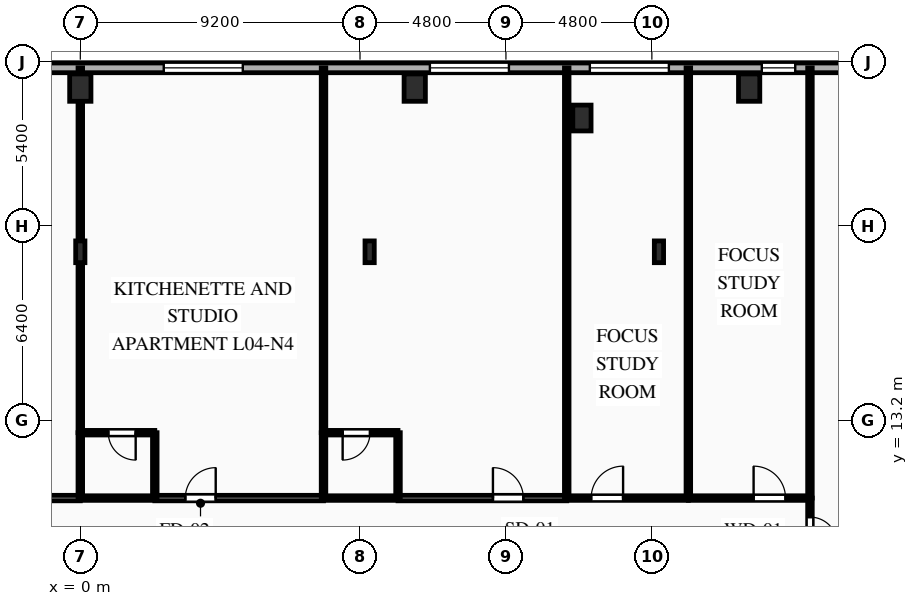
"""IFC4 building model, lengths in metres.
Left out: names, types, materials, properties, quantities, classifications, styles, units other than length and angle.
Written with IfcOpenShell. Run it as: python <this file> out.ifc"""

import sys

from ifc_helpers import new_model, si_unit, direction, frame, frame_2d, origin, origin_2d, place, context, subcontext, project, spatial, rectangle, i_section, extrude, element, fill, save


model = new_model("IFC4")
c1 = context("Model", 3, precision=1e-05, world=origin(), true_north=direction((0.0, 1.0)))
c2 = subcontext(c1, "Body", "Model", "MODEL_VIEW")
j1 = project(units=[si_unit("LENGTHUNIT", "METRE"), si_unit("PLANEANGLEUNIT", "RADIAN")], contexts=[c1])
p1 = place(None, origin())
s1 = spatial("IfcSite", under=j1, at=p1, CompositionType="ELEMENT")
p2 = place(p1, origin())
s2 = spatial("IfcBuilding", under=s1, at=p2, CompositionType="ELEMENT")
p3 = place(p2, frame((0.0, 0.0, 18.0)))
s3 = spatial("IfcBuildingStorey", under=s2, at=p3, CompositionType="ELEMENT", Elevation=18.0)
for number, where, z_axis, x_axis in (
    (1, (0.0, 24.15, 0.0), (0.0, 0.0, 1.0), (1.0, 0.0, 0.0)),
    (2, (11.0, 24.15, 0.0), (0.0, 0.0, 1.0), (1.0, 0.0, 0.0)),
    (3, (22.0, 24.15, 0.0), (0.0, 0.0, 1.0), (1.0, 0.0, 0.0)),
):
    element("IfcColumn", number, at=place(p3, frame(where, z_axis=z_axis, x_axis=x_axis)), inside=s3, PredefinedType="COLUMN", context=c2, shape_type="SweptSolid", body=[
        extrude(rectangle(XDim=0.7, YDim=0.9, at=origin_2d()), origin(), (0.0, 0.0, 1.0), 4.5),
    ])
p4 = place(p3, frame((16.5, 23.15, 0.0), z_axis=(0.0, 0.0, 1.0), x_axis=(1.0, 0.0, 0.0)))
e4 = element("IfcColumn", 4, at=p4, inside=s3, PredefinedType="PILASTER", context=c2, shape_type="SweptSolid", body=[
    extrude(rectangle(XDim=0.6, YDim=0.85, at=origin_2d()), origin(), (0.0, 0.0, 1.0), 4.5),
])
for number, where, z_axis, x_axis in (
    (5, (19.033, 18.75, 0.0), (0.0, 0.0, 1.0), (1.0, 0.0, 0.0)),
    (6, (9.517, 18.75, 0.0), (0.0, 0.0, 1.0), (1.0, 0.0, 0.0)),
    (7, (0.0, 18.75, 0.0), (0.0, 0.0, 1.0), (1.0, 0.0, 0.0)),
):
    element("IfcColumn", number, at=place(p3, frame(where, z_axis=z_axis, x_axis=x_axis)), inside=s3, PredefinedType="COLUMN", context=c2, shape_type="SweptSolid", body=[
        extrude(i_section(OverallWidth=0.304, OverallDepth=0.716, WebThickness=0.021, FlangeThickness=0.04, FilletRadius=0.027, at=origin_2d()), origin(), (0.0, 0.0, 1.0), 4.5),
    ])
p5 = place(p3, frame((-36.8, 24.8, 0.0), z_axis=(0.0, 0.0, 1.0), x_axis=(1.0, 0.0, 0.0)))
e8 = element("IfcWall", 8, at=p5, inside=s3, PredefinedType="SOLIDWALL", context=c2, shape_type="SweptSolid", body=[
    extrude(rectangle(XDim=73.6, YDim=0.32, at=frame_2d((36.8, 0.0))), origin(), (0.0, 0.0, 1.0), 4.17),
])
p6 = place(p5, frame((1.079, 0.0, 0.85)))
e9 = element("IfcOpeningElement", 9, at=p6, cuts=e8, PredefinedType="OPENING", context=c2, shape_type="SweptSolid", body=[
    extrude(rectangle(XDim=2.3, YDim=2.4, at=frame_2d((1.15, 1.2))), frame((0.0, 0.17, 0.0), z_axis=(0.0, -1.0, 0.0), x_axis=(1.0, 0.0, 0.0)), (0.0, 0.0, 1.0), 0.34),
])
p7 = place(p5, frame((8.431, 0.0, 0.85)))
e10 = element("IfcOpeningElement", 10, at=p7, cuts=e8, PredefinedType="OPENING", context=c2, shape_type="SweptSolid", body=[
    extrude(rectangle(XDim=2.6, YDim=2.4, at=frame_2d((1.3, 1.2))), frame((0.0, 0.17, 0.0), z_axis=(0.0, -1.0, 0.0), x_axis=(1.0, 0.0, 0.0)), (0.0, 0.0, 1.0), 0.34),
])
p8 = place(p5, frame((15.168, 0.0, 0.85)))
e11 = element("IfcOpeningElement", 11, at=p8, cuts=e8, PredefinedType="OPENING", context=c2, shape_type="SweptSolid", body=[
    extrude(rectangle(XDim=1.1, YDim=1.85, at=frame_2d((0.55, 0.925))), frame((0.0, 0.17, 0.0), z_axis=(0.0, -1.0, 0.0), x_axis=(1.0, 0.0, 0.0)), (0.0, 0.0, 1.0), 0.34),
])
p9 = place(p5, frame((17.521, 0.0, 0.85)))
e12 = element("IfcOpeningElement", 12, at=p9, cuts=e8, PredefinedType="OPENING", context=c2, shape_type="SweptSolid", body=[
    extrude(rectangle(XDim=2.6, YDim=2.4, at=frame_2d((1.3, 1.2))), frame((0.0, 0.17, 0.0), z_axis=(0.0, -1.0, 0.0), x_axis=(1.0, 0.0, 0.0)), (0.0, 0.0, 1.0), 0.34),
])
p10 = place(p5, frame((26.246, 0.0, 0.85)))
e13 = element("IfcOpeningElement", 13, at=p10, cuts=e8, PredefinedType="OPENING", context=c2, shape_type="SweptSolid", body=[
    extrude(rectangle(XDim=2.0, YDim=2.4, at=frame_2d((1.0, 1.2))), frame((0.0, 0.17, 0.0), z_axis=(0.0, -1.0, 0.0), x_axis=(1.0, 0.0, 0.0)), (0.0, 0.0, 1.0), 0.34),
])
p11 = place(p5, frame((31.536, 0.0, 0.85)))
e14 = element("IfcOpeningElement", 14, at=p11, cuts=e8, PredefinedType="OPENING", context=c2, shape_type="SweptSolid", body=[
    extrude(rectangle(XDim=2.6, YDim=2.4, at=frame_2d((1.3, 1.2))), frame((0.0, 0.17, 0.0), z_axis=(0.0, -1.0, 0.0), x_axis=(1.0, 0.0, 0.0)), (0.0, 0.0, 1.0), 0.34),
])
p12 = place(p5, frame((39.544, 0.0, 0.85)))
e15 = element("IfcOpeningElement", 15, at=p12, cuts=e8, PredefinedType="OPENING", context=c2, shape_type="SweptSolid", body=[
    extrude(rectangle(XDim=2.6, YDim=2.4, at=frame_2d((1.3, 1.2))), frame((0.0, 0.17, 0.0), z_axis=(0.0, -1.0, 0.0), x_axis=(1.0, 0.0, 0.0)), (0.0, 0.0, 1.0), 0.34),
])
p13 = place(p5, frame((48.298, 0.0, 0.85)))
e16 = element("IfcOpeningElement", 16, at=p13, cuts=e8, PredefinedType="OPENING", context=c2, shape_type="SweptSolid", body=[
    extrude(rectangle(XDim=2.6, YDim=2.4, at=frame_2d((1.3, 1.2))), frame((0.0, 0.17, 0.0), z_axis=(0.0, -1.0, 0.0), x_axis=(1.0, 0.0, 0.0)), (0.0, 0.0, 1.0), 0.34),
])
p14 = place(p5, frame((53.56, 0.0, 0.85)))
e17 = element("IfcOpeningElement", 17, at=p14, cuts=e8, PredefinedType="OPENING", context=c2, shape_type="SweptSolid", body=[
    extrude(rectangle(XDim=2.6, YDim=2.4, at=frame_2d((1.3, 1.2))), frame((0.0, 0.17, 0.0), z_axis=(0.0, -1.0, 0.0), x_axis=(1.0, 0.0, 0.0)), (0.0, 0.0, 1.0), 0.34),
])
p15 = place(p5, frame((59.216, 0.0, 0.85)))
e18 = element("IfcOpeningElement", 18, at=p15, cuts=e8, PredefinedType="OPENING", context=c2, shape_type="SweptSolid", body=[
    extrude(rectangle(XDim=1.1, YDim=1.85, at=frame_2d((0.55, 0.925))), frame((0.0, 0.17, 0.0), z_axis=(0.0, -1.0, 0.0), x_axis=(1.0, 0.0, 0.0)), (0.0, 0.0, 1.0), 0.34),
])
p16 = place(p5, frame((62.649, 0.0, 0.85)))
e19 = element("IfcOpeningElement", 19, at=p16, cuts=e8, PredefinedType="OPENING", context=c2, shape_type="SweptSolid", body=[
    extrude(rectangle(XDim=2.6, YDim=2.4, at=frame_2d((1.3, 1.2))), frame((0.0, 0.17, 0.0), z_axis=(0.0, -1.0, 0.0), x_axis=(1.0, 0.0, 0.0)), (0.0, 0.0, 1.0), 0.34),
])
p17 = place(p5, frame((70.301, 0.0, 0.85)))
e20 = element("IfcOpeningElement", 20, at=p17, cuts=e8, PredefinedType="OPENING", context=c2, shape_type="SweptSolid", body=[
    extrude(rectangle(XDim=2.3, YDim=2.4, at=frame_2d((1.15, 1.2))), frame((0.0, 0.17, 0.0), z_axis=(0.0, -1.0, 0.0), x_axis=(1.0, 0.0, 0.0)), (0.0, 0.0, 1.0), 0.34),
])
p18 = place(p3, frame((-5.55, 10.65, 0.0), z_axis=(0.0, 0.0, 1.0), x_axis=(1.0, 0.0, 0.0)))
e21 = element("IfcWall", 21, at=p18, inside=s3, PredefinedType="PARTITIONING", context=c2, shape_type="SweptSolid", body=[
    extrude(rectangle(XDim=5.55, YDim=0.18, at=frame_2d((2.775, 0.0))), origin(), (0.0, 0.0, 1.0), 4.17),
])
p19 = place(p18, frame((3.123, 0.0, 0.0)))
e22 = element("IfcOpeningElement", 22, at=p19, cuts=e21, PredefinedType="OPENING", context=c2, shape_type="SweptSolid", body=[
    extrude(rectangle(XDim=1.0, YDim=2.15, at=frame_2d((0.5, 1.075))), frame((0.0, 0.1, 0.0), z_axis=(0.0, -1.0, 0.0), x_axis=(1.0, 0.0, 0.0)), (0.0, 0.0, 1.0), 0.2),
])
p20 = place(p3, frame((24.0, 10.65, 0.0), z_axis=(0.0, 0.0, 1.0), x_axis=(0.0, -1.0, 0.0)))
e23 = element("IfcWall", 23, at=p20, inside=s3, PredefinedType="PARTITIONING", context=c2, shape_type="SweptSolid", body=[
    extrude(rectangle(XDim=2.15, YDim=0.15, at=frame_2d((1.075, 0.0))), origin(), (0.0, 0.0, 1.0), 4.17),
])
p21 = place(p20, frame((0.625, 0.0, 0.0)))
e24 = element("IfcOpeningElement", 24, at=p21, cuts=e23, PredefinedType="OPENING", context=c2, shape_type="SweptSolid", body=[
    extrude(rectangle(XDim=0.9, YDim=2.1, at=frame_2d((0.45, 1.05))), frame((0.0, 0.085, 0.0), z_axis=(0.0, -1.0, 0.0), x_axis=(1.0, 0.0, 0.0)), (0.0, 0.0, 1.0), 0.17),
])
p22 = place(p3, frame((2.45, 10.65, 0.0), z_axis=(0.0, 0.0, 1.0), x_axis=(1.0, 0.0, 0.0)))
e25 = element("IfcWall", 25, at=p22, inside=s3, PredefinedType="PARTITIONING", context=c2, shape_type="SweptSolid", body=[
    extrude(rectangle(XDim=5.55, YDim=0.18, at=frame_2d((2.775, 0.0))), origin(), (0.0, 0.0, 1.0), 4.17),
])
p23 = place(p22, frame((1.004, 0.0, 0.0)))
e26 = element("IfcOpeningElement", 26, at=p23, cuts=e25, PredefinedType="OPENING", context=c2, shape_type="SweptSolid", body=[
    extrude(rectangle(XDim=1.0, YDim=2.15, at=frame_2d((0.5, 1.075))), frame((0.0, 0.1, 0.0), z_axis=(0.0, -1.0, 0.0), x_axis=(1.0, 0.0, 0.0)), (0.0, 0.0, 1.0), 0.2),
])
p24 = place(p3, frame((0.0, 10.65, 0.0), z_axis=(0.0, 0.0, 1.0), x_axis=(1.0, 0.0, 0.0)))
e27 = element("IfcWall", 27, at=p24, inside=s3, PredefinedType="PLUMBINGWALL", context=c2, shape_type="SweptSolid", body=[
    extrude(rectangle(XDim=2.45, YDim=0.15, at=frame_2d((1.225, 0.0))), origin(), (0.0, 0.0, 1.0), 4.17),
])
p25 = place(p3, frame((10.45, 10.65, 0.0), z_axis=(0.0, 0.0, 1.0), x_axis=(1.0, 0.0, 0.0)))
e28 = element("IfcWall", 28, at=p25, inside=s3, PredefinedType="PARTITIONING", context=c2, shape_type="SweptSolid", body=[
    extrude(rectangle(XDim=5.55, YDim=0.18, at=frame_2d((2.775, 0.0))), origin(), (0.0, 0.0, 1.0), 4.17),
])
p26 = place(p25, frame((3.123, 0.0, 0.0)))
e29 = element("IfcOpeningElement", 29, at=p26, cuts=e28, PredefinedType="OPENING", context=c2, shape_type="SweptSolid", body=[
    extrude(rectangle(XDim=1.0, YDim=2.15, at=frame_2d((0.5, 1.075))), frame((0.0, 0.1, 0.0), z_axis=(0.0, -1.0, 0.0), x_axis=(1.0, 0.0, 0.0)), (0.0, 0.0, 1.0), 0.2),
])
p27 = place(p3, frame((8.0, 10.65, 0.0), z_axis=(0.0, 0.0, 1.0), x_axis=(1.0, 0.0, 0.0)))
e30 = element("IfcWall", 30, at=p27, inside=s3, PredefinedType="PLUMBINGWALL", context=c2, shape_type="SweptSolid", body=[
    extrude(rectangle(XDim=2.45, YDim=0.15, at=frame_2d((1.225, 0.0))), origin(), (0.0, 0.0, 1.0), 4.17),
])
p28 = place(p3, frame((16.0, 10.65, 0.0), z_axis=(0.0, 0.0, 1.0), x_axis=(1.0, 0.0, 0.0)))
e31 = element("IfcWall", 31, at=p28, inside=s3, PredefinedType="PARTITIONING", context=c2, shape_type="SweptSolid", body=[
    extrude(rectangle(XDim=4.0, YDim=0.15, at=frame_2d((2.0, 0.0))), origin(), (0.0, 0.0, 1.0), 4.17),
])
p29 = place(p28, frame((0.804, 0.0, 0.0)))
e32 = element("IfcOpeningElement", 32, at=p29, cuts=e31, PredefinedType="OPENING", context=c2, shape_type="SweptSolid", body=[
    extrude(rectangle(XDim=1.05, YDim=2.15, at=frame_2d((0.525, 1.075))), frame((0.0, 0.085, 0.0), z_axis=(0.0, -1.0, 0.0), x_axis=(1.0, 0.0, 0.0)), (0.0, 0.0, 1.0), 0.17),
])
p30 = place(p3, frame((20.0, 10.65, 0.0), z_axis=(0.0, 0.0, 1.0), x_axis=(1.0, 0.0, 0.0)))
e33 = element("IfcWall", 33, at=p30, inside=s3, PredefinedType="PARTITIONING", context=c2, shape_type="SweptSolid", body=[
    extrude(rectangle(XDim=4.0, YDim=0.15, at=frame_2d((2.0, 0.0))), origin(), (0.0, 0.0, 1.0), 4.17),
])
p31 = place(p30, frame((2.146, 0.0, 0.0)))
e34 = element("IfcOpeningElement", 34, at=p31, cuts=e33, PredefinedType="OPENING", context=c2, shape_type="SweptSolid", body=[
    extrude(rectangle(XDim=1.05, YDim=2.15, at=frame_2d((0.525, 1.075))), frame((0.0, 0.085, 0.0), z_axis=(0.0, -1.0, 0.0), x_axis=(1.0, 0.0, 0.0)), (0.0, 0.0, 1.0), 0.17),
])
p32 = place(p3, frame((24.0, 10.65, 0.0), z_axis=(0.0, 0.0, 1.0), x_axis=(0.0, 1.0, 0.0)))
e35 = element("IfcWall", 35, at=p32, inside=s3, PredefinedType="PARTITIONING", context=c2, shape_type="SweptSolid", body=[
    extrude(rectangle(XDim=14.15, YDim=0.15, at=frame_2d((7.075, 0.0))), origin(), (0.0, 0.0, 1.0), 4.17),
])
p33 = place(p3, frame((0.0, 24.8, 0.0), z_axis=(0.0, 0.0, 1.0), x_axis=(0.0, -1.0, 0.0)))
e36 = element("IfcWall", 36, at=p33, inside=s3, PredefinedType="PARTITIONING", context=c2, shape_type="SweptSolid", body=[
    extrude(rectangle(XDim=12.0, YDim=0.15, at=frame_2d((6.0, 0.0))), origin(), (0.0, 0.0, 1.0), 3.555),
])
p34 = place(p3, frame((0.0, 12.8, 0.0), z_axis=(0.0, 0.0, 1.0), x_axis=(0.0, -1.0, 0.0)))
e37 = element("IfcWall", 37, at=p34, inside=s3, PredefinedType="PLUMBINGWALL", context=c2, shape_type="SweptSolid", body=[
    extrude(rectangle(XDim=2.15, YDim=0.15, at=frame_2d((1.075, 0.0))), origin(), (0.0, 0.0, 1.0), 4.17),
])
p35 = place(p3, frame((2.45, 12.8, 0.0), z_axis=(0.0, 0.0, 1.0), x_axis=(-1.0, 0.0, 0.0)))
e38 = element("IfcWall", 38, at=p35, inside=s3, PredefinedType="PLUMBINGWALL", context=c2, shape_type="SweptSolid", body=[
    extrude(rectangle(XDim=2.45, YDim=0.15, at=frame_2d((1.225, 0.0))), origin(), (0.0, 0.0, 1.0), 4.17),
])
p36 = place(p35, frame((0.629, 0.0, 0.0)))
e39 = element("IfcOpeningElement", 39, at=p36, cuts=e38, PredefinedType="OPENING", context=c2, shape_type="SweptSolid", body=[
    extrude(rectangle(XDim=0.9, YDim=2.1, at=frame_2d((0.45, 1.05))), frame((0.0, 0.085, 0.0), z_axis=(0.0, -1.0, 0.0), x_axis=(1.0, 0.0, 0.0)), (0.0, 0.0, 1.0), 0.17),
])
p37 = place(p3, frame((2.45, 10.65, 0.0), z_axis=(0.0, 0.0, 1.0), x_axis=(0.0, 1.0, 0.0)))
e40 = element("IfcWall", 40, at=p37, inside=s3, PredefinedType="PLUMBINGWALL", context=c2, shape_type="SweptSolid", body=[
    extrude(rectangle(XDim=2.15, YDim=0.15, at=frame_2d((1.075, 0.0))), origin(), (0.0, 0.0, 1.0), 4.17),
])
p38 = place(p3, frame((8.0, 24.8, 0.0), z_axis=(0.0, 0.0, 1.0), x_axis=(0.0, -1.0, 0.0)))
e41 = element("IfcWall", 41, at=p38, inside=s3, PredefinedType="PARTITIONING", context=c2, shape_type="SweptSolid", body=[
    extrude(rectangle(XDim=12.0, YDim=0.15, at=frame_2d((6.0, 0.0))), origin(), (0.0, 0.0, 1.0), 4.17),
])
p39 = place(p3, frame((8.0, 12.8, 0.0), z_axis=(0.0, 0.0, 1.0), x_axis=(0.0, -1.0, 0.0)))
e42 = element("IfcWall", 42, at=p39, inside=s3, PredefinedType="PLUMBINGWALL", context=c2, shape_type="SweptSolid", body=[
    extrude(rectangle(XDim=2.15, YDim=0.15, at=frame_2d((1.075, 0.0))), origin(), (0.0, 0.0, 1.0), 4.17),
])
p40 = place(p3, frame((10.45, 12.8, 0.0), z_axis=(0.0, 0.0, 1.0), x_axis=(-1.0, 0.0, 0.0)))
e43 = element("IfcWall", 43, at=p40, inside=s3, PredefinedType="PLUMBINGWALL", context=c2, shape_type="SweptSolid", body=[
    extrude(rectangle(XDim=2.45, YDim=0.15, at=frame_2d((1.225, 0.0))), origin(), (0.0, 0.0, 1.0), 4.17),
])
p41 = place(p40, frame((0.921, 0.0, 0.0)))
e44 = element("IfcOpeningElement", 44, at=p41, cuts=e43, PredefinedType="OPENING", context=c2, shape_type="SweptSolid", body=[
    extrude(rectangle(XDim=0.9, YDim=2.1, at=frame_2d((0.45, 1.05))), frame((0.0, 0.085, 0.0), z_axis=(0.0, -1.0, 0.0), x_axis=(1.0, 0.0, 0.0)), (0.0, 0.0, 1.0), 0.17),
])
p42 = place(p3, frame((10.45, 10.65, 0.0), z_axis=(0.0, 0.0, 1.0), x_axis=(0.0, 1.0, 0.0)))
e45 = element("IfcWall", 45, at=p42, inside=s3, PredefinedType="PLUMBINGWALL", context=c2, shape_type="SweptSolid", body=[
    extrude(rectangle(XDim=2.15, YDim=0.15, at=frame_2d((1.075, 0.0))), origin(), (0.0, 0.0, 1.0), 4.17),
])
for number, where, z_axis, x_axis in (
    (46, (16.0, 24.8, 0.0), (0.0, 0.0, 1.0), (0.0, -1.0, 0.0)),
    (47, (20.0, 24.8, 0.0), (0.0, 0.0, 1.0), (0.0, -1.0, 0.0)),
):
    element("IfcWall", number, at=place(p3, frame(where, z_axis=z_axis, x_axis=x_axis)), inside=s3, PredefinedType="PARTITIONING", context=c2, shape_type="SweptSolid", body=[
        extrude(rectangle(XDim=14.15, YDim=0.15, at=frame_2d((7.075, 0.0))), origin(), (0.0, 0.0, 1.0), 4.17),
    ])
p43 = place(p12, origin())
e48 = element("IfcWindow", 48, at=p43, inside=s3, PartitioningType="SINGLE_PANEL", PredefinedType="WINDOW", context=c2, shape_type="SweptSolid", body=[
    extrude(rectangle(XDim=2.6, YDim=2.4, at=frame_2d((1.3, 1.2))), frame((0.0, 0.03, 0.0), z_axis=(0.0, -1.0, 0.0), x_axis=(1.0, 0.0, 0.0)), (0.0, 0.0, 1.0), 0.06),
])
fill(e15, e48)
p44 = place(p13, origin())
e49 = element("IfcWindow", 49, at=p44, inside=s3, PartitioningType="SINGLE_PANEL", PredefinedType="WINDOW", context=c2, shape_type="SweptSolid", body=[
    extrude(rectangle(XDim=2.6, YDim=2.4, at=frame_2d((1.3, 1.2))), frame((0.0, 0.03, 0.0), z_axis=(0.0, -1.0, 0.0), x_axis=(1.0, 0.0, 0.0)), (0.0, 0.0, 1.0), 0.06),
])
fill(e16, e49)
p45 = place(p14, origin())
e50 = element("IfcWindow", 50, at=p45, inside=s3, PartitioningType="SINGLE_PANEL", PredefinedType="WINDOW", context=c2, shape_type="SweptSolid", body=[
    extrude(rectangle(XDim=2.6, YDim=2.4, at=frame_2d((1.3, 1.2))), frame((0.0, 0.03, 0.0), z_axis=(0.0, -1.0, 0.0), x_axis=(1.0, 0.0, 0.0)), (0.0, 0.0, 1.0), 0.06),
])
fill(e17, e50)
p46 = place(p15, origin())
e51 = element("IfcWindow", 51, at=p46, inside=s3, PartitioningType="SINGLE_PANEL", PredefinedType="WINDOW", context=c2, shape_type="SweptSolid", body=[
    extrude(rectangle(XDim=1.1, YDim=1.85, at=frame_2d((0.55, 0.925))), frame((0.0, 0.03, 0.0), z_axis=(0.0, -1.0, 0.0), x_axis=(1.0, 0.0, 0.0)), (0.0, 0.0, 1.0), 0.06),
])
fill(e18, e51)
p47 = place(p21, origin())
e52 = element("IfcDoor", 52, at=p47, inside=s3, OperationType="SINGLE_SWING_RIGHT", PredefinedType="DOOR", context=c2, shape_type="SweptSolid", body=[
    extrude(rectangle(XDim=0.9, YDim=2.1, at=frame_2d((0.45, 1.05))), frame((0.0, 0.025, 0.0), z_axis=(0.0, -1.0, 0.0), x_axis=(1.0, 0.0, 0.0)), (0.0, 0.0, 1.0), 0.05),
])
fill(e24, e52)
p48 = place(p23, origin())
e53 = element("IfcDoor", 53, at=p48, inside=s3, OperationType="SINGLE_SWING_RIGHT", PredefinedType="DOOR", context=c2, shape_type="SweptSolid", body=[
    extrude(rectangle(XDim=1.0, YDim=2.15, at=frame_2d((0.5, 1.075))), frame((0.0, 0.025, 0.0), z_axis=(0.0, -1.0, 0.0), x_axis=(1.0, 0.0, 0.0)), (0.0, 0.0, 1.0), 0.05),
])
fill(e26, e53)
p49 = place(p26, origin())
e54 = element("IfcDoor", 54, at=p49, inside=s3, OperationType="SINGLE_SWING_LEFT", PredefinedType="DOOR", context=c2, shape_type="SweptSolid", body=[
    extrude(rectangle(XDim=1.0, YDim=2.15, at=frame_2d((0.5, 1.075))), frame((0.0, 0.025, 0.0), z_axis=(0.0, -1.0, 0.0), x_axis=(1.0, 0.0, 0.0)), (0.0, 0.0, 1.0), 0.05),
])
fill(e29, e54)
p50 = place(p29, origin())
e55 = element("IfcDoor", 55, at=p50, inside=s3, OperationType="SINGLE_SWING_RIGHT", PredefinedType="DOOR", context=c2, shape_type="SweptSolid", body=[
    extrude(rectangle(XDim=1.05, YDim=2.15, at=frame_2d((0.525, 1.075))), frame((0.0, 0.025, 0.0), z_axis=(0.0, -1.0, 0.0), x_axis=(1.0, 0.0, 0.0)), (0.0, 0.0, 1.0), 0.05),
])
fill(e32, e55)
p51 = place(p31, origin())
e56 = element("IfcDoor", 56, at=p51, inside=s3, OperationType="SINGLE_SWING_LEFT", PredefinedType="DOOR", context=c2, shape_type="SweptSolid", body=[
    extrude(rectangle(XDim=1.05, YDim=2.15, at=frame_2d((0.525, 1.075))), frame((0.0, 0.025, 0.0), z_axis=(0.0, -1.0, 0.0), x_axis=(1.0, 0.0, 0.0)), (0.0, 0.0, 1.0), 0.05),
])
fill(e34, e56)
p52 = place(p36, origin())
e57 = element("IfcDoor", 57, at=p52, inside=s3, OperationType="SINGLE_SWING_LEFT", PredefinedType="DOOR", context=c2, shape_type="SweptSolid", body=[
    extrude(rectangle(XDim=0.9, YDim=2.1, at=frame_2d((0.45, 1.05))), frame((0.0, 0.025, 0.0), z_axis=(0.0, -1.0, 0.0), x_axis=(1.0, 0.0, 0.0)), (0.0, 0.0, 1.0), 0.05),
])
fill(e39, e57)
p53 = place(p41, origin())
e58 = element("IfcDoor", 58, at=p53, inside=s3, OperationType="SINGLE_SWING_RIGHT", PredefinedType="DOOR", context=c2, shape_type="SweptSolid", body=[
    extrude(rectangle(XDim=0.9, YDim=2.1, at=frame_2d((0.45, 1.05))), frame((0.0, 0.025, 0.0), z_axis=(0.0, -1.0, 0.0), x_axis=(1.0, 0.0, 0.0)), (0.0, 0.0, 1.0), 0.05),
])
fill(e44, e58)
save(model, sys.argv[1])
